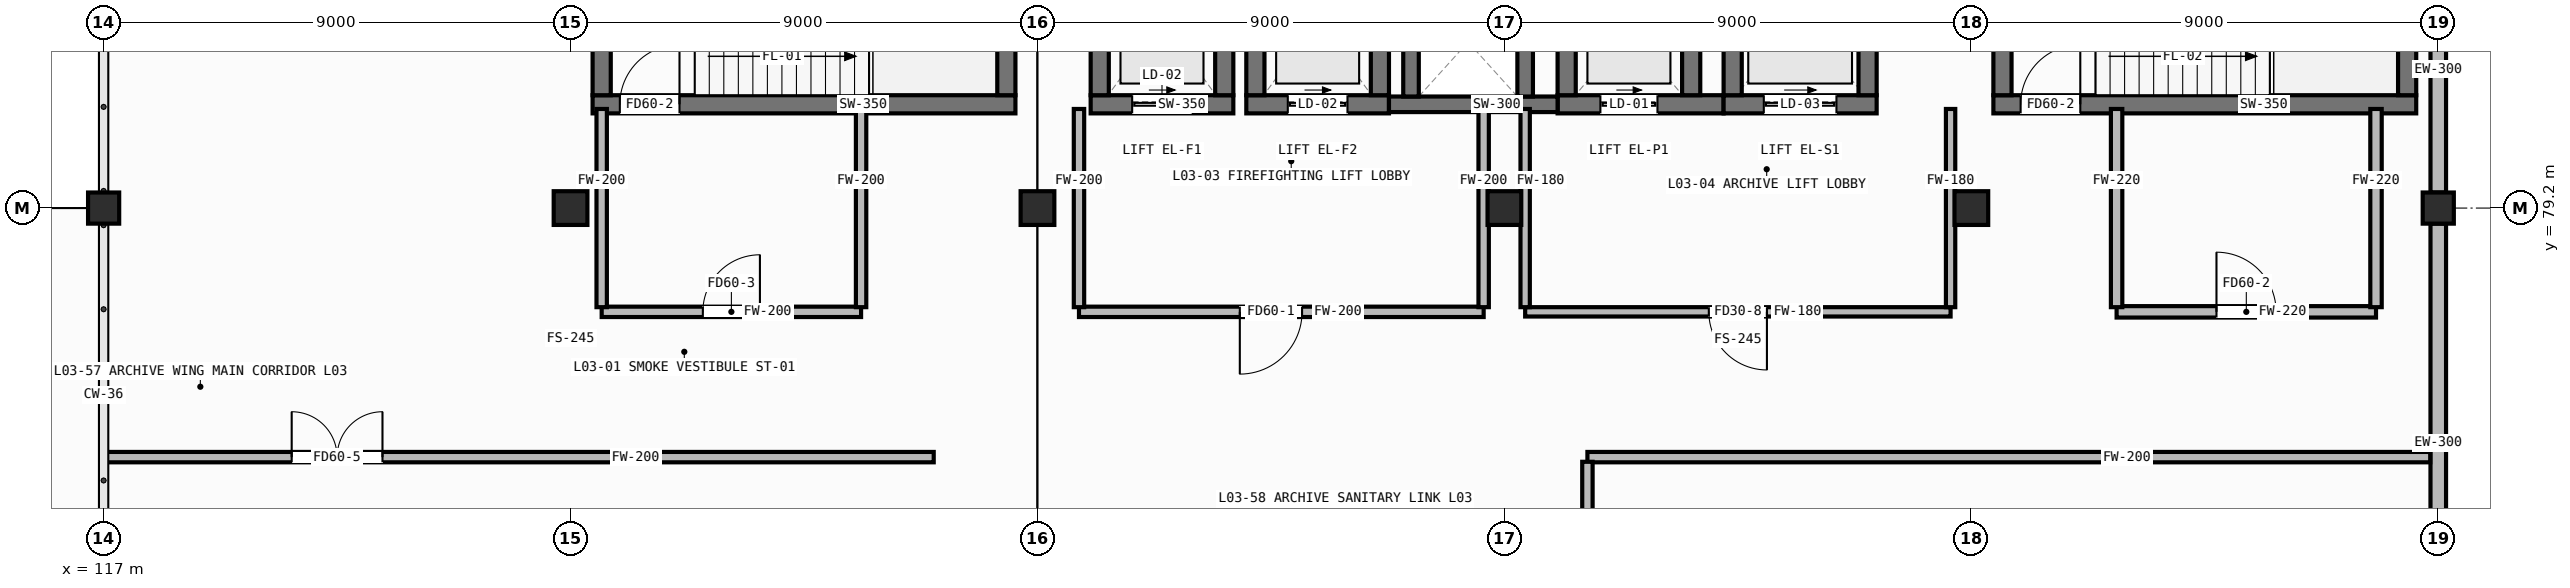
"""IFC4 building model, lengths in metres.
Left out: names, types, materials, properties, quantities, classifications, styles, units other than length and angle.
Written with IfcOpenShell. Run it as: python <this file> out.ifc"""

import sys

from ifc_helpers import new_model, si_unit, direction, frame, frame_2d, origin, origin_2d, place, context, subcontext, project, spatial, rectangle, hollow_rectangle, extrude, element, fill, save


model = new_model("IFC4")
c1 = context("Model", 3, precision=1e-05, world=origin(), true_north=direction((0.0, 1.0)))
c2 = subcontext(c1, "Body", "Model", "MODEL_VIEW")
j1 = project(units=[si_unit("LENGTHUNIT", "METRE"), si_unit("PLANEANGLEUNIT", "RADIAN")], contexts=[c1])
p1 = place(None, origin())
s1 = spatial("IfcSite", under=j1, at=p1, CompositionType="ELEMENT")
p2 = place(p1, origin())
s2 = spatial("IfcBuilding", under=s1, at=p2, CompositionType="ELEMENT")
p3 = place(p2, frame((0.0, 0.0, 8.8)))
s3 = spatial("IfcBuildingStorey", under=s2, at=p3, CompositionType="ELEMENT", Elevation=8.8)
p4 = place(p3, frame((117.0, 79.2, 0.0), z_axis=(0.0, 0.0, 1.0), x_axis=(1.0, 0.0, 0.0)))
e1 = element("IfcColumn", 1, at=p4, inside=s3, PredefinedType="COLUMN", context=c2, shape_type="SweptSolid", body=[
    extrude(hollow_rectangle(XDim=0.6, YDim=0.6, WallThickness=0.025, at=origin_2d()), origin(), (0.0, 0.0, 1.0), 4.0),
])
for number, where, z_axis, x_axis in (
    (2, (126.0, 79.2, 0.0), (0.0, 0.0, 1.0), (1.0, 0.0, 0.0)),
    (3, (135.0, 79.2, 0.0), (0.0, 0.0, 1.0), (1.0, 0.0, 0.0)),
    (4, (144.0, 79.2, 0.0), (0.0, 0.0, 1.0), (1.0, 0.0, 0.0)),
    (5, (153.0, 79.2, 0.0), (0.0, 0.0, 1.0), (1.0, 0.0, 0.0)),
):
    element("IfcColumn", number, at=place(p3, frame(where, z_axis=z_axis, x_axis=x_axis)), inside=s3, PredefinedType="COLUMN", context=c2, shape_type="SweptSolid", body=[
        extrude(hollow_rectangle(XDim=0.65, YDim=0.65, WallThickness=0.025, at=origin_2d()), origin(), (0.0, 0.0, 1.0), 4.0),
    ])
p5 = place(p3, frame((162.0, 79.2, 0.0), z_axis=(0.0, 0.0, 1.0), x_axis=(1.0, 0.0, 0.0)))
e6 = element("IfcColumn", 6, at=p5, inside=s3, PredefinedType="COLUMN", context=c2, shape_type="SweptSolid", body=[
    extrude(hollow_rectangle(XDim=0.6, YDim=0.6, WallThickness=0.025, at=origin_2d()), origin(), (0.0, 0.0, 1.0), 4.0),
])
p6 = place(p3, frame((162.0, 78.9, 0.0), z_axis=(0.0, 0.0, 1.0), x_axis=(0.0, -1.0, 0.0)))
e7 = element("IfcWall", 7, at=p6, inside=s3, PredefinedType="STANDARD", context=c2, shape_type="SweptSolid", body=[
    extrude(rectangle(XDim=6.6, YDim=0.3, at=frame_2d((3.3, 0.0))), origin(), (0.0, 0.0, 1.0), 3.295),
])
p7 = place(p3, frame((162.0, 86.1, 0.0), z_axis=(0.0, 0.0, 1.0), x_axis=(0.0, -1.0, 0.0)))
e8 = element("IfcWall", 8, at=p7, inside=s3, PredefinedType="STANDARD", context=c2, shape_type="SweptSolid", body=[
    extrude(rectangle(XDim=6.6, YDim=0.3, at=frame_2d((3.3, 0.0))), origin(), (0.0, 0.0, 1.0), 3.295),
])
p8 = place(p3, frame((126.425, 81.2, 0.0), z_axis=(0.0, 0.0, 1.0), x_axis=(1.0, 0.0, 0.0)))
e9 = element("IfcWall", 9, at=p8, inside=s3, PredefinedType="SHEAR", context=c2, shape_type="SweptSolid", body=[
    extrude(rectangle(XDim=8.15, YDim=0.35, at=frame_2d((4.075, 0.0))), origin(), (0.0, 0.0, 1.0), 3.745),
])
p9 = place(p8, frame((0.525, 0.0, 0.0)))
e10 = element("IfcOpeningElement", 10, at=p9, cuts=e9, PredefinedType="OPENING", context=c2, shape_type="SweptSolid", body=[
    extrude(rectangle(XDim=1.15, YDim=2.1, at=frame_2d((0.575, 1.05))), frame((0.0, 0.187, 0.0), z_axis=(0.0, -1.0, 0.0), x_axis=(1.0, 0.0, 0.0)), (0.0, 0.0, 1.0), 0.374),
])
for number, where, z_axis, x_axis in (
    (11, (126.6, 81.375, 0.0), (0.0, 0.0, 1.0), (0.0, 1.0, 0.0)),
    (12, (134.4, 81.375, 0.0), (0.0, 0.0, 1.0), (0.0, 1.0, 0.0)),
):
    element("IfcWall", number, at=place(p3, frame(where, z_axis=z_axis, x_axis=x_axis)), inside=s3, PredefinedType="SHEAR", context=c2, shape_type="SweptSolid", body=[
        extrude(rectangle(XDim=3.55, YDim=0.35, at=frame_2d((1.775, 0.0))), origin(), (0.0, 0.0, 1.0), 3.745),
    ])
p10 = place(p3, frame((153.425, 81.2, 0.0), z_axis=(0.0, 0.0, 1.0), x_axis=(1.0, 0.0, 0.0)))
e13 = element("IfcWall", 13, at=p10, inside=s3, PredefinedType="SHEAR", context=c2, shape_type="SweptSolid", body=[
    extrude(rectangle(XDim=8.15, YDim=0.35, at=frame_2d((4.075, 0.0))), origin(), (0.0, 0.0, 1.0), 3.745),
])
p11 = place(p10, frame((0.525, 0.0, 0.0)))
e14 = element("IfcOpeningElement", 14, at=p11, cuts=e13, PredefinedType="OPENING", context=c2, shape_type="SweptSolid", body=[
    extrude(rectangle(XDim=1.15, YDim=2.1, at=frame_2d((0.575, 1.05))), frame((0.0, 0.187, 0.0), z_axis=(0.0, -1.0, 0.0), x_axis=(1.0, 0.0, 0.0)), (0.0, 0.0, 1.0), 0.374),
])
for number, where, z_axis, x_axis in (
    (15, (153.6, 81.375, 0.0), (0.0, 0.0, 1.0), (0.0, 1.0, 0.0)),
    (16, (161.4, 81.375, 0.0), (0.0, 0.0, 1.0), (0.0, 1.0, 0.0)),
):
    element("IfcWall", number, at=place(p3, frame(where, z_axis=z_axis, x_axis=x_axis)), inside=s3, PredefinedType="SHEAR", context=c2, shape_type="SweptSolid", body=[
        extrude(rectangle(XDim=3.55, YDim=0.35, at=frame_2d((1.775, 0.0))), origin(), (0.0, 0.0, 1.0), 3.745),
    ])
p12 = place(p3, frame((136.025, 81.2, 0.0), z_axis=(0.0, 0.0, 1.0), x_axis=(1.0, 0.0, 0.0)))
e17 = element("IfcWall", 17, at=p12, inside=s3, PredefinedType="SHEAR", context=c2, shape_type="SweptSolid", body=[
    extrude(rectangle(XDim=2.75, YDim=0.35, at=frame_2d((1.375, 0.0))), origin(), (0.0, 0.0, 1.0), 3.745),
])
p13 = place(p12, frame((0.8, 0.0, 0.0)))
e18 = element("IfcOpeningElement", 18, at=p13, cuts=e17, PredefinedType="OPENING", context=c2, shape_type="SweptSolid", body=[
    extrude(rectangle(XDim=1.15, YDim=2.12, at=frame_2d((0.575, 1.06))), frame((0.0, 0.187, 0.0), z_axis=(0.0, -1.0, 0.0), x_axis=(1.0, 0.0, 0.0)), (0.0, 0.0, 1.0), 0.374),
])
for number, where, z_axis, x_axis in (
    (19, (136.2, 81.375, 0.0), (0.0, 0.0, 1.0), (0.0, 1.0, 0.0)),
    (20, (138.6, 81.375, 0.0), (0.0, 0.0, 1.0), (0.0, 1.0, 0.0)),
):
    element("IfcWall", number, at=place(p3, frame(where, z_axis=z_axis, x_axis=x_axis)), inside=s3, PredefinedType="SHEAR", context=c2, shape_type="SweptSolid", body=[
        extrude(rectangle(XDim=2.85, YDim=0.35, at=frame_2d((1.425, 0.0))), origin(), (0.0, 0.0, 1.0), 3.745),
    ])
p14 = place(p3, frame((139.025, 81.2, 0.0), z_axis=(0.0, 0.0, 1.0), x_axis=(1.0, 0.0, 0.0)))
e21 = element("IfcWall", 21, at=p14, inside=s3, PredefinedType="SHEAR", context=c2, shape_type="SweptSolid", body=[
    extrude(rectangle(XDim=2.75, YDim=0.35, at=frame_2d((1.375, 0.0))), origin(), (0.0, 0.0, 1.0), 3.745),
])
p15 = place(p14, frame((0.8, 0.0, 0.0)))
e22 = element("IfcOpeningElement", 22, at=p15, cuts=e21, PredefinedType="OPENING", context=c2, shape_type="SweptSolid", body=[
    extrude(rectangle(XDim=1.15, YDim=2.12, at=frame_2d((0.575, 1.06))), frame((0.0, 0.187, 0.0), z_axis=(0.0, -1.0, 0.0), x_axis=(1.0, 0.0, 0.0)), (0.0, 0.0, 1.0), 0.374),
])
for number, where, z_axis, x_axis in (
    (23, (139.2, 81.375, 0.0), (0.0, 0.0, 1.0), (0.0, 1.0, 0.0)),
    (24, (141.6, 81.375, 0.0), (0.0, 0.0, 1.0), (0.0, 1.0, 0.0)),
):
    element("IfcWall", number, at=place(p3, frame(where, z_axis=z_axis, x_axis=x_axis)), inside=s3, PredefinedType="SHEAR", context=c2, shape_type="SweptSolid", body=[
        extrude(rectangle(XDim=2.85, YDim=0.35, at=frame_2d((1.425, 0.0))), origin(), (0.0, 0.0, 1.0), 3.745),
    ])
p16 = place(p3, frame((145.025, 81.2, 0.0), z_axis=(0.0, 0.0, 1.0), x_axis=(1.0, 0.0, 0.0)))
e25 = element("IfcWall", 25, at=p16, inside=s3, PredefinedType="SHEAR", context=c2, shape_type="SweptSolid", body=[
    extrude(rectangle(XDim=3.2, YDim=0.35, at=frame_2d((1.6, 0.0))), origin(), (0.0, 0.0, 1.0), 3.745),
])
p17 = place(p16, frame((0.825, 0.0, 0.0)))
e26 = element("IfcOpeningElement", 26, at=p17, cuts=e25, PredefinedType="OPENING", context=c2, shape_type="SweptSolid", body=[
    extrude(rectangle(XDim=1.1, YDim=2.1, at=frame_2d((0.55, 1.05))), frame((0.0, 0.187, 0.0), z_axis=(0.0, -1.0, 0.0), x_axis=(1.0, 0.0, 0.0)), (0.0, 0.0, 1.0), 0.374),
])
for number, where, z_axis, x_axis in (
    (27, (145.2, 81.375, 0.0), (0.0, 0.0, 1.0), (0.0, 1.0, 0.0)),
    (28, (147.6, 81.375, 0.0), (0.0, 0.0, 1.0), (0.0, 1.0, 0.0)),
):
    element("IfcWall", number, at=place(p3, frame(where, z_axis=z_axis, x_axis=x_axis)), inside=s3, PredefinedType="SHEAR", context=c2, shape_type="SweptSolid", body=[
        extrude(rectangle(XDim=2.45, YDim=0.35, at=frame_2d((1.225, 0.0))), origin(), (0.0, 0.0, 1.0), 3.745),
    ])
p18 = place(p3, frame((148.225, 81.2, 0.0), z_axis=(0.0, 0.0, 1.0), x_axis=(1.0, 0.0, 0.0)))
e29 = element("IfcWall", 29, at=p18, inside=s3, PredefinedType="SHEAR", context=c2, shape_type="SweptSolid", body=[
    extrude(rectangle(XDim=2.95, YDim=0.35, at=frame_2d((1.475, 0.0))), origin(), (0.0, 0.0, 1.0), 3.745),
])
p19 = place(p18, frame((0.775, 0.0, 0.0)))
e30 = element("IfcOpeningElement", 30, at=p19, cuts=e29, PredefinedType="OPENING", context=c2, shape_type="SweptSolid", body=[
    extrude(rectangle(XDim=1.4, YDim=2.15, at=frame_2d((0.7, 1.075))), frame((0.0, 0.187, 0.0), z_axis=(0.0, -1.0, 0.0), x_axis=(1.0, 0.0, 0.0)), (0.0, 0.0, 1.0), 0.374),
])
for number, where, z_axis, x_axis in (
    (31, (148.4, 81.375, 0.0), (0.0, 0.0, 1.0), (0.0, 1.0, 0.0)),
    (32, (151.0, 81.375, 0.0), (0.0, 0.0, 1.0), (0.0, 1.0, 0.0)),
):
    element("IfcWall", number, at=place(p3, frame(where, z_axis=z_axis, x_axis=x_axis)), inside=s3, PredefinedType="SHEAR", context=c2, shape_type="SweptSolid", body=[
        extrude(rectangle(XDim=3.05, YDim=0.35, at=frame_2d((1.525, 0.0))), origin(), (0.0, 0.0, 1.0), 3.745),
    ])
p20 = place(p3, frame((141.775, 81.2, 0.0), z_axis=(0.0, 0.0, 1.0), x_axis=(1.0, 0.0, 0.0)))
e33 = element("IfcWall", 33, at=p20, inside=s3, PredefinedType="SHEAR", context=c2, shape_type="SweptSolid", body=[
    extrude(rectangle(XDim=3.25, YDim=0.3, at=frame_2d((1.625, 0.0))), origin(), (0.0, 0.0, 1.0), 3.745),
])
for number, where, z_axis, x_axis in (
    (34, (142.2, 81.35, 0.0), (0.0, 0.0, 1.0), (0.0, 1.0, 0.0)),
    (35, (144.4, 81.35, 0.0), (0.0, 0.0, 1.0), (0.0, 1.0, 0.0)),
):
    element("IfcWall", number, at=place(p3, frame(where, z_axis=z_axis, x_axis=x_axis)), inside=s3, PredefinedType="SHEAR", context=c2, shape_type="SweptSolid", body=[
        extrude(rectangle(XDim=2.1, YDim=0.3, at=frame_2d((1.05, 0.0))), origin(), (0.0, 0.0, 1.0), 3.745),
    ])
p21 = place(p3, frame((126.6, 77.2, 0.0), z_axis=(0.0, 0.0, 1.0), x_axis=(1.0, 0.0, 0.0)))
e36 = element("IfcWall", 36, at=p21, inside=s3, PredefinedType="PARTITIONING", context=c2, shape_type="SweptSolid", body=[
    extrude(rectangle(XDim=5.0, YDim=0.2, at=frame_2d((2.5, 0.0))), origin(), (0.0, 0.0, 1.0), 3.745),
])
p22 = place(p21, frame((1.95, 0.0, 0.0)))
e37 = element("IfcOpeningElement", 37, at=p22, cuts=e36, PredefinedType="OPENING", context=c2, shape_type="SweptSolid", body=[
    extrude(rectangle(XDim=1.1, YDim=2.08, at=frame_2d((0.55, 1.04))), frame((0.0, 0.112, 0.0), z_axis=(0.0, -1.0, 0.0), x_axis=(1.0, 0.0, 0.0)), (0.0, 0.0, 1.0), 0.224),
])
for number, where, z_axis, x_axis in (
    (38, (126.6, 77.29, 0.0), (0.0, 0.0, 1.0), (0.0, 1.0, 0.0)),
    (39, (131.6, 77.29, 0.0), (0.0, 0.0, 1.0), (0.0, 1.0, 0.0)),
):
    element("IfcWall", number, at=place(p3, frame(where, z_axis=z_axis, x_axis=x_axis)), inside=s3, PredefinedType="PARTITIONING", context=c2, shape_type="SweptSolid", body=[
        extrude(rectangle(XDim=3.82, YDim=0.2, at=frame_2d((1.91, 0.0))), origin(), (0.0, 0.0, 1.0), 3.745),
    ])
p23 = place(p3, frame((155.8, 77.2, 0.0), z_axis=(0.0, 0.0, 1.0), x_axis=(1.0, 0.0, 0.0)))
e40 = element("IfcWall", 40, at=p23, inside=s3, PredefinedType="PARTITIONING", context=c2, shape_type="SweptSolid", body=[
    extrude(rectangle(XDim=5.0, YDim=0.22, at=frame_2d((2.5, 0.0))), origin(), (0.0, 0.0, 1.0), 3.745),
])
p24 = place(p23, frame((1.925, 0.0, 0.0)))
e41 = element("IfcOpeningElement", 41, at=p24, cuts=e40, PredefinedType="OPENING", context=c2, shape_type="SweptSolid", body=[
    extrude(rectangle(XDim=1.15, YDim=2.1, at=frame_2d((0.575, 1.05))), frame((0.0, 0.122, 0.0), z_axis=(0.0, -1.0, 0.0), x_axis=(1.0, 0.0, 0.0)), (0.0, 0.0, 1.0), 0.244),
])
for number, where, z_axis, x_axis in (
    (42, (155.8, 77.29, 0.0), (0.0, 0.0, 1.0), (0.0, 1.0, 0.0)),
    (43, (160.8, 77.29, 0.0), (0.0, 0.0, 1.0), (0.0, 1.0, 0.0)),
):
    element("IfcWall", number, at=place(p3, frame(where, z_axis=z_axis, x_axis=x_axis)), inside=s3, PredefinedType="PARTITIONING", context=c2, shape_type="SweptSolid", body=[
        extrude(rectangle(XDim=3.82, YDim=0.22, at=frame_2d((1.91, 0.0))), origin(), (0.0, 0.0, 1.0), 3.745),
    ])
p25 = place(p3, frame((135.8, 77.2, 0.0), z_axis=(0.0, 0.0, 1.0), x_axis=(1.0, 0.0, 0.0)))
e44 = element("IfcWall", 44, at=p25, inside=s3, PredefinedType="PARTITIONING", context=c2, shape_type="SweptSolid", body=[
    extrude(rectangle(XDim=7.8, YDim=0.2, at=frame_2d((3.9, 0.0))), origin(), (0.0, 0.0, 1.0), 3.745),
])
p26 = place(p25, frame((3.1, 0.0, 0.0)))
e45 = element("IfcOpeningElement", 45, at=p26, cuts=e44, PredefinedType="OPENING", context=c2, shape_type="SweptSolid", body=[
    extrude(rectangle(XDim=1.2, YDim=2.1, at=frame_2d((0.6, 1.05))), frame((0.0, 0.112, 0.0), z_axis=(0.0, -1.0, 0.0), x_axis=(1.0, 0.0, 0.0)), (0.0, 0.0, 1.0), 0.224),
])
for number, where, z_axis, x_axis in (
    (46, (135.8, 77.29, 0.0), (0.0, 0.0, 1.0), (0.0, 1.0, 0.0)),
    (47, (143.6, 77.29, 0.0), (0.0, 0.0, 1.0), (0.0, 1.0, 0.0)),
):
    element("IfcWall", number, at=place(p3, frame(where, z_axis=z_axis, x_axis=x_axis)), inside=s3, PredefinedType="PARTITIONING", context=c2, shape_type="SweptSolid", body=[
        extrude(rectangle(XDim=3.82, YDim=0.2, at=frame_2d((1.91, 0.0))), origin(), (0.0, 0.0, 1.0), 3.745),
    ])
p27 = place(p3, frame((144.4, 77.2, 0.0), z_axis=(0.0, 0.0, 1.0), x_axis=(1.0, 0.0, 0.0)))
e48 = element("IfcWall", 48, at=p27, inside=s3, PredefinedType="PARTITIONING", context=c2, shape_type="SweptSolid", body=[
    extrude(rectangle(XDim=8.2, YDim=0.18, at=frame_2d((4.1, 0.0))), origin(), (0.0, 0.0, 1.0), 3.745),
])
p28 = place(p27, frame((3.54, 0.0, 0.0)))
e49 = element("IfcOpeningElement", 49, at=p28, cuts=e48, PredefinedType="OPENING", context=c2, shape_type="SweptSolid", body=[
    extrude(rectangle(XDim=1.12, YDim=2.08, at=frame_2d((0.56, 1.04))), frame((0.0, 0.102, 0.0), z_axis=(0.0, -1.0, 0.0), x_axis=(1.0, 0.0, 0.0)), (0.0, 0.0, 1.0), 0.204),
])
for number, where, z_axis, x_axis in (
    (50, (144.4, 77.29, 0.0), (0.0, 0.0, 1.0), (0.0, 1.0, 0.0)),
    (51, (152.6, 77.29, 0.0), (0.0, 0.0, 1.0), (0.0, 1.0, 0.0)),
):
    element("IfcWall", number, at=place(p3, frame(where, z_axis=z_axis, x_axis=x_axis)), inside=s3, PredefinedType="PARTITIONING", context=c2, shape_type="SweptSolid", body=[
        extrude(rectangle(XDim=3.82, YDim=0.18, at=frame_2d((1.91, 0.0))), origin(), (0.0, 0.0, 1.0), 3.745),
    ])
p29 = place(p3, frame((117.035, 74.4, 0.0), z_axis=(0.0, 0.0, 1.0), x_axis=(1.0, 0.0, 0.0)))
e52 = element("IfcWall", 52, at=p29, inside=s3, PredefinedType="PARTITIONING", context=c2, shape_type="SweptSolid", body=[
    extrude(rectangle(XDim=15.965, YDim=0.2, at=frame_2d((7.982, 0.0))), origin(), (0.0, 0.0, 1.0), 3.745),
])
p30 = place(p29, frame((3.59, 0.0, 0.0)))
e53 = element("IfcOpeningElement", 53, at=p30, cuts=e52, PredefinedType="OPENING", context=c2, shape_type="SweptSolid", body=[
    extrude(rectangle(XDim=1.75, YDim=2.12, at=frame_2d((0.875, 1.06))), frame((0.0, 0.112, 0.0), z_axis=(0.0, -1.0, 0.0), x_axis=(1.0, 0.0, 0.0)), (0.0, 0.0, 1.0), 0.224),
])
p31 = place(p3, frame((145.6, 74.4, 0.0), z_axis=(0.0, 0.0, 1.0), x_axis=(1.0, 0.0, 0.0)))
e54 = element("IfcWall", 54, at=p31, inside=s3, PredefinedType="PARTITIONING", context=c2, shape_type="SweptSolid", body=[
    extrude(rectangle(XDim=16.245, YDim=0.2, at=frame_2d((8.123, 0.0))), origin(), (0.0, 0.0, 1.0), 3.745),
])
p32 = place(p3, frame((145.6, 43.365, 0.0), z_axis=(0.0, 0.0, 1.0), x_axis=(0.0, 1.0, 0.0)))
e55 = element("IfcWall", 55, at=p32, inside=s3, PredefinedType="PARTITIONING", context=c2, shape_type="SweptSolid", body=[
    extrude(rectangle(XDim=30.945, YDim=0.2, at=frame_2d((15.473, 0.0))), origin(), (0.0, 0.0, 1.0), 3.745),
])
p33 = place(p32, frame((17.16, 0.0, 0.0)))
e56 = element("IfcOpeningElement", 56, at=p33, cuts=e55, PredefinedType="OPENING", context=c2, shape_type="SweptSolid", body=[
    extrude(rectangle(XDim=1.35, YDim=2.08, at=frame_2d((0.675, 1.04))), frame((0.0, 0.112, 0.0), z_axis=(0.0, -1.0, 0.0), x_axis=(1.0, 0.0, 0.0)), (0.0, 0.0, 1.0), 0.224),
])
p34 = place(p9, origin())
e57 = element("IfcDoor", 57, at=p34, inside=s3, OperationType="SINGLE_SWING_RIGHT", PredefinedType="DOOR", context=c2, shape_type="SweptSolid", body=[
    extrude(rectangle(XDim=1.15, YDim=2.1, at=frame_2d((0.575, 1.05))), frame((0.0, 0.025, 0.0), z_axis=(0.0, -1.0, 0.0), x_axis=(1.0, 0.0, 0.0)), (0.0, 0.0, 1.0), 0.05),
])
fill(e10, e57)
p35 = place(p11, origin())
e58 = element("IfcDoor", 58, at=p35, inside=s3, OperationType="SINGLE_SWING_RIGHT", PredefinedType="DOOR", context=c2, shape_type="SweptSolid", body=[
    extrude(rectangle(XDim=1.15, YDim=2.1, at=frame_2d((0.575, 1.05))), frame((0.0, 0.025, 0.0), z_axis=(0.0, -1.0, 0.0), x_axis=(1.0, 0.0, 0.0)), (0.0, 0.0, 1.0), 0.05),
])
fill(e14, e58)
p36 = place(p13, origin())
e59 = element("IfcDoor", 59, at=p36, inside=s3, OperationType="SLIDING_TO_LEFT", PredefinedType="DOOR", context=c2, shape_type="SweptSolid", body=[
    extrude(rectangle(XDim=1.15, YDim=2.12, at=frame_2d((0.575, 1.06))), frame((0.0, 0.025, 0.0), z_axis=(0.0, -1.0, 0.0), x_axis=(1.0, 0.0, 0.0)), (0.0, 0.0, 1.0), 0.05),
])
fill(e18, e59)
p37 = place(p15, origin())
e60 = element("IfcDoor", 60, at=p37, inside=s3, OperationType="SLIDING_TO_LEFT", PredefinedType="DOOR", context=c2, shape_type="SweptSolid", body=[
    extrude(rectangle(XDim=1.15, YDim=2.12, at=frame_2d((0.575, 1.06))), frame((0.0, 0.025, 0.0), z_axis=(0.0, -1.0, 0.0), x_axis=(1.0, 0.0, 0.0)), (0.0, 0.0, 1.0), 0.05),
])
fill(e22, e60)
p38 = place(p17, origin())
e61 = element("IfcDoor", 61, at=p38, inside=s3, OperationType="SLIDING_TO_LEFT", PredefinedType="DOOR", context=c2, shape_type="SweptSolid", body=[
    extrude(rectangle(XDim=1.1, YDim=2.1, at=frame_2d((0.55, 1.05))), frame((0.0, 0.025, 0.0), z_axis=(0.0, -1.0, 0.0), x_axis=(1.0, 0.0, 0.0)), (0.0, 0.0, 1.0), 0.05),
])
fill(e26, e61)
p39 = place(p19, origin())
e62 = element("IfcDoor", 62, at=p39, inside=s3, OperationType="SLIDING_TO_LEFT", PredefinedType="DOOR", context=c2, shape_type="SweptSolid", body=[
    extrude(rectangle(XDim=1.4, YDim=2.15, at=frame_2d((0.7, 1.075))), frame((0.0, 0.025, 0.0), z_axis=(0.0, -1.0, 0.0), x_axis=(1.0, 0.0, 0.0)), (0.0, 0.0, 1.0), 0.05),
])
fill(e30, e62)
p40 = place(p22, origin())
e63 = element("IfcDoor", 63, at=p40, inside=s3, OperationType="SINGLE_SWING_RIGHT", PredefinedType="DOOR", context=c2, shape_type="SweptSolid", body=[
    extrude(rectangle(XDim=1.1, YDim=2.08, at=frame_2d((0.55, 1.04))), frame((0.0, 0.025, 0.0), z_axis=(0.0, -1.0, 0.0), x_axis=(1.0, 0.0, 0.0)), (0.0, 0.0, 1.0), 0.05),
])
fill(e37, e63)
p41 = place(p24, origin())
e64 = element("IfcDoor", 64, at=p41, inside=s3, OperationType="SINGLE_SWING_LEFT", PredefinedType="DOOR", context=c2, shape_type="SweptSolid", body=[
    extrude(rectangle(XDim=1.15, YDim=2.1, at=frame_2d((0.575, 1.05))), frame((0.0, 0.025, 0.0), z_axis=(0.0, -1.0, 0.0), x_axis=(1.0, 0.0, 0.0)), (0.0, 0.0, 1.0), 0.05),
])
fill(e41, e64)
p42 = place(p26, frame((1.2, 0.0, 0.0), z_axis=(0.0, 0.0, 1.0), x_axis=(-1.0, 0.0, 0.0)))
e65 = element("IfcDoor", 65, at=p42, inside=s3, OperationType="SINGLE_SWING_RIGHT", PredefinedType="DOOR", context=c2, shape_type="SweptSolid", body=[
    extrude(rectangle(XDim=1.2, YDim=2.1, at=frame_2d((0.6, 1.05))), frame((0.0, 0.025, 0.0), z_axis=(0.0, -1.0, 0.0), x_axis=(1.0, 0.0, 0.0)), (0.0, 0.0, 1.0), 0.05),
])
fill(e45, e65)
p43 = place(p28, frame((1.12, 0.0, 0.0), z_axis=(0.0, 0.0, 1.0), x_axis=(-1.0, 0.0, 0.0)))
e66 = element("IfcDoor", 66, at=p43, inside=s3, OperationType="SINGLE_SWING_LEFT", PredefinedType="DOOR", context=c2, shape_type="SweptSolid", body=[
    extrude(rectangle(XDim=1.12, YDim=2.08, at=frame_2d((0.56, 1.04))), frame((0.0, 0.025, 0.0), z_axis=(0.0, -1.0, 0.0), x_axis=(1.0, 0.0, 0.0)), (0.0, 0.0, 1.0), 0.05),
])
fill(e49, e66)
p44 = place(p30, origin())
e67 = element("IfcDoor", 67, at=p44, inside=s3, OperationType="DOUBLE_DOOR_SINGLE_SWING", PredefinedType="DOOR", context=c2, shape_type="SweptSolid", body=[
    extrude(rectangle(XDim=1.75, YDim=2.12, at=frame_2d((0.875, 1.06))), frame((0.0, 0.025, 0.0), z_axis=(0.0, -1.0, 0.0), x_axis=(1.0, 0.0, 0.0)), (0.0, 0.0, 1.0), 0.05),
])
fill(e53, e67)
save(model, sys.argv[1])
